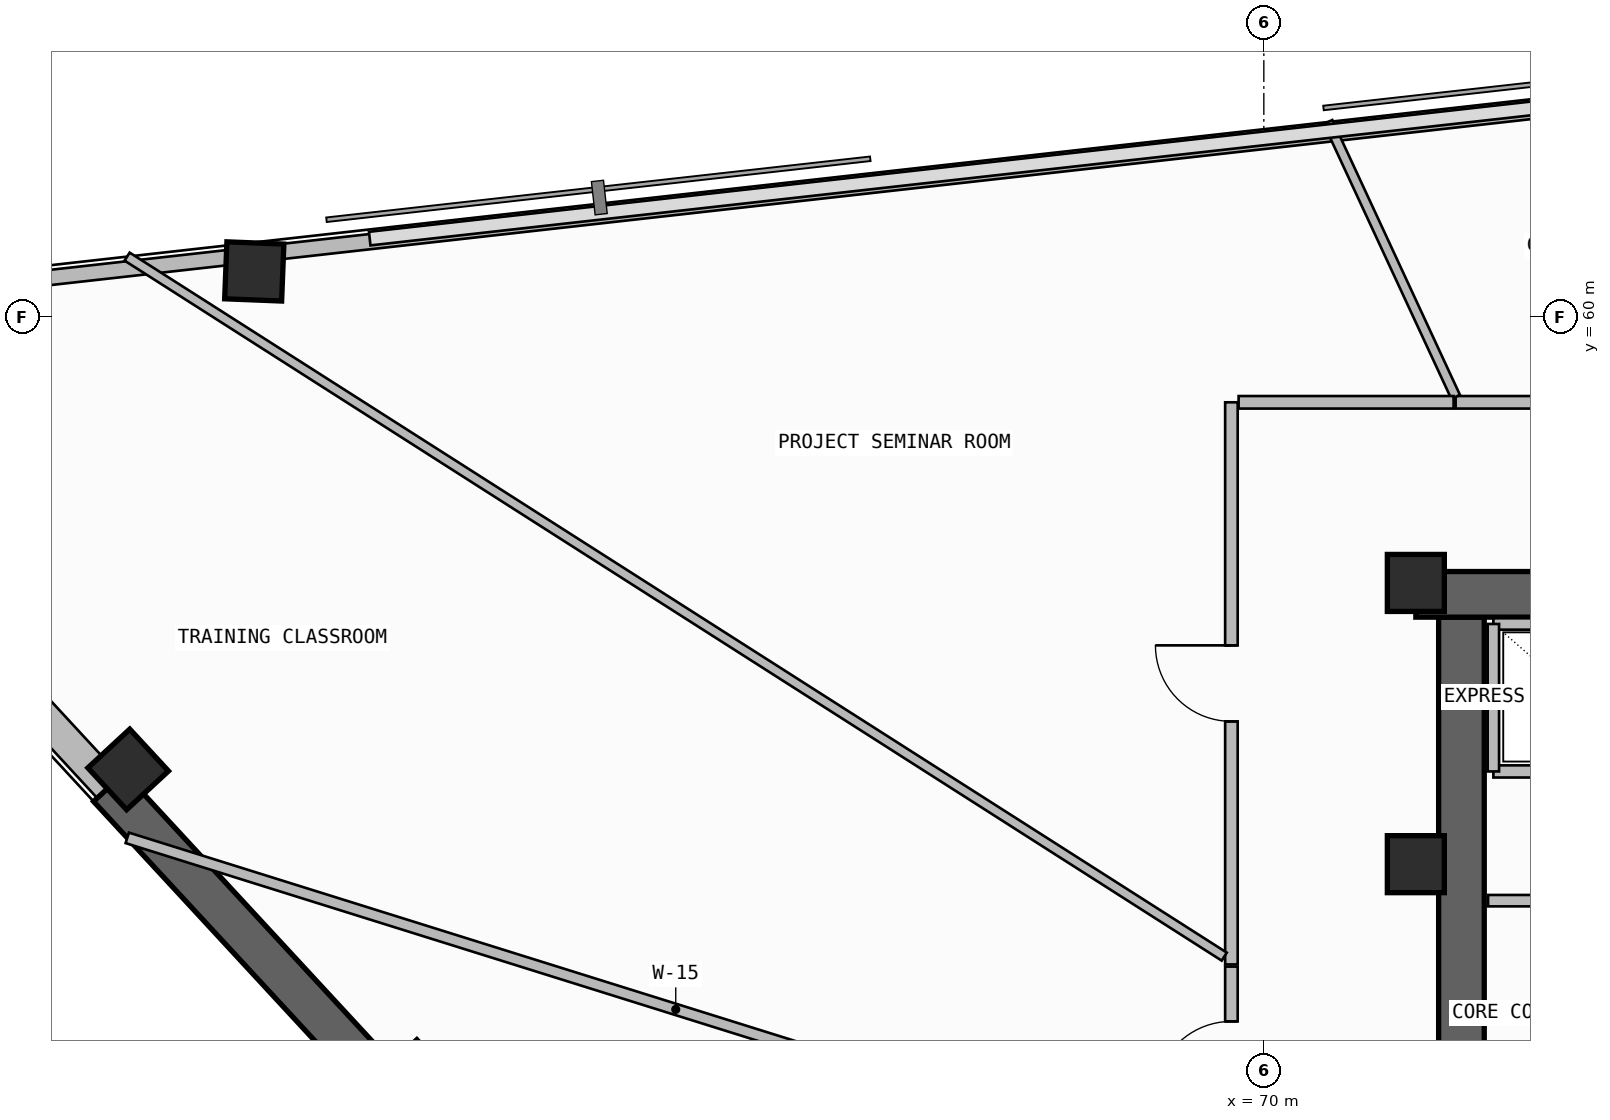
"""IFC4 building model, lengths in metres.
Left out: names, types, materials, properties, quantities, classifications, styles, units other than length and angle.
Written with IfcOpenShell. Run it as: python <this file> out.ifc"""

import sys

from ifc_helpers import new_model, si_unit, direction, frame, frame_2d, origin, origin_2d, place, context, subcontext, project, spatial, rectangle, extrude, element, fill, save


model = new_model("IFC4")
c1 = context("Model", 3, precision=1e-05, world=origin(), true_north=direction((0.0, 1.0)))
c2 = subcontext(c1, "Body", "Model", "MODEL_VIEW")
j1 = project(units=[si_unit("LENGTHUNIT", "METRE"), si_unit("PLANEANGLEUNIT", "RADIAN")], contexts=[c1])
p1 = place(None, origin())
s1 = spatial("IfcSite", under=j1, at=p1, CompositionType="ELEMENT")
p2 = place(p1, origin())
s2 = spatial("IfcBuilding", under=s1, at=p2, CompositionType="ELEMENT")
p3 = place(p2, frame((0.0, 0.0, 271.3)))
s3 = spatial("IfcBuildingStorey", under=s2, at=p3, CompositionType="ELEMENT", Elevation=271.3)
p4 = place(p3, frame((72.6, 43.35, -0.26), z_axis=(0.0, 0.0, 1.0), x_axis=(0.0, 1.0, 0.0)))
e1 = element("IfcWall", 1, at=p4, inside=s3, PredefinedType="SHEAR", context=c2, shape_type="SweptSolid", body=[
    extrude(rectangle(XDim=12.7, YDim=0.6, at=frame_2d((6.35, 0.0))), origin(), (0.0, 0.0, 1.0), 3.52),
])
p5 = place(p4, frame((1.35, 0.0, 0.26)))
e2 = element("IfcOpeningElement", 2, at=p5, cuts=e1, PredefinedType="OPENING", context=c2, shape_type="SweptSolid", body=[
    extrude(rectangle(XDim=1.2, YDim=2.2, at=frame_2d((0.6, 1.1))), frame((0.0, 0.31, 0.0), z_axis=(0.0, -1.0, 0.0), x_axis=(1.0, 0.0, 0.0)), (0.0, 0.0, 1.0), 0.62),
])
p6 = place(p3, frame((72.0, 56.35, -0.26), z_axis=(0.0, 0.0, 1.0), x_axis=(1.0, 0.0, 0.0)))
e3 = element("IfcWall", 3, at=p6, inside=s3, PredefinedType="SHEAR", context=c2, shape_type="SweptSolid", body=[
    extrude(rectangle(XDim=13.6, YDim=0.6, at=frame_2d((6.8, 0.0))), origin(), (0.0, 0.0, 1.0), 3.52),
])
for number, where, z_axis, x_axis in (
    (4, (72.0, 52.8, 0.0), (0.0, 0.0, 1.0), (1.0, 0.0, 0.0)),
    (5, (72.0, 56.5, 0.0), (0.0, 0.0, 1.0), (1.0, 0.0, 0.0)),
    (6, (56.717, 60.598, 0.0), (0.0, 0.0, 1.0), (0.039, 0.999, 0.0)),
    (7, (55.058, 54.046, 0.0), (0.0, 0.0, 1.0), (-0.679, 0.734, 0.0)),
    (8, (58.835, 49.961, 0.0), (0.0, 0.0, 1.0), (-0.679, 0.734, 0.0)),
):
    element("IfcColumn", number, at=place(p3, frame(where, z_axis=z_axis, x_axis=x_axis)), inside=s3, PredefinedType="COLUMN", context=c2, shape_type="SweptSolid", body=[
        extrude(rectangle(XDim=0.75, YDim=0.75, at=origin_2d()), origin(), (0.0, 0.0, 1.0), 3.52),
    ])
p7 = place(p3, frame((51.5, 57.387, 0.0), z_axis=(0.0, 0.0, 1.0), x_axis=(0.67880684669, -0.734316869537, 0.0)))
e9 = element("IfcWall", 9, at=p7, inside=s3, PredefinedType="SOLIDWALL", context=c2, shape_type="SweptSolid", body=[
    extrude(rectangle(XDim=4.869, YDim=0.42, at=frame_2d((2.434, 0.0))), origin(), (0.0, 0.0, 1.0), 2.645),
])
p8 = place(p7, frame((0.9, 0.0, 1.1)))
e10 = element("IfcOpeningElement", 10, at=p8, cuts=e9, PredefinedType="OPENING", context=c2, shape_type="SweptSolid", body=[
    extrude(rectangle(XDim=2.4, YDim=1.2, at=frame_2d((1.2, 0.6))), frame((0.0, 0.22, 0.0), z_axis=(0.0, -1.0, 0.0), x_axis=(1.0, 0.0, 0.0)), (0.0, 0.0, 1.0), 0.44),
])
p9 = place(p3, frame((54.805, 53.812, -0.26), z_axis=(0.0, 0.0, 1.0), x_axis=(0.678803115619, -0.734320318543, 0.0)))
e11 = element("IfcWall", 11, at=p9, inside=s3, PredefinedType="SHEAR", context=c2, shape_type="SweptSolid", body=[
    extrude(rectangle(XDim=18.083, YDim=0.55, at=frame_2d((9.042, 0.0))), origin(), (0.0, 0.0, 1.0), 3.52),
])
p10 = place(p9, frame((7.434, 0.0, 1.1)))
e12 = element("IfcOpeningElement", 12, at=p10, cuts=e11, PredefinedType="OPENING", context=c2, shape_type="SweptSolid", body=[
    extrude(rectangle(XDim=2.4, YDim=1.2, at=frame_2d((1.2, 0.6))), frame((0.0, 0.285, 0.0), z_axis=(0.0, -1.0, 0.0), x_axis=(1.0, 0.0, 0.0)), (0.0, 0.0, 1.0), 0.57),
])
p11 = place(p3, frame((81.557, 63.604, 0.0), z_axis=(0.0, 0.0, 1.0), x_axis=(-0.993776455024, -0.111392806945, 0.0)))
e13 = element("IfcWall", 13, at=p11, inside=s3, PredefinedType="PARAPET", context=c2, shape_type="SweptSolid", body=[
    extrude(rectangle(XDim=24.891, YDim=0.2, at=frame_2d((12.446, 0.0))), origin(), (0.0, 0.0, 1.0), 1.15),
])
p12 = place(p3, frame((56.565, 60.802, 0.0), z_axis=(0.0, 0.0, 1.0), x_axis=(-0.99377164586, -0.111435702918, 0.0)))
e14 = element("IfcWall", 14, at=p12, inside=s3, PredefinedType="PARAPET", context=c2, shape_type="SweptSolid", body=[
    extrude(rectangle(XDim=4.616, YDim=0.2, at=frame_2d((2.308, 0.0))), origin(), (0.0, 0.0, 1.0), 1.15),
])
p13 = place(p3, frame((72.95, 52.32, 0.0), z_axis=(0.0, 0.0, 1.0), x_axis=(1.0, 0.0, 0.0)))
e15 = element("IfcWall", 15, at=p13, inside=s3, PredefinedType="SOLIDWALL", context=c2, shape_type="SweptSolid", body=[
    extrude(rectangle(XDim=3.33, YDim=0.15, at=frame_2d((1.665, 0.0))), origin(), (0.0, 0.0, 1.0), 3.26),
])
p14 = place(p3, frame((73.02, 54.02, 0.0), z_axis=(0.0, 0.0, 1.0), x_axis=(1.0, 0.0, 0.0)))
e16 = element("IfcWall", 16, at=p14, inside=s3, PredefinedType="SOLIDWALL", context=c2, shape_type="SweptSolid", body=[
    extrude(rectangle(XDim=12.08, YDim=0.16, at=frame_2d((6.04, 0.0))), origin(), (0.0, 0.0, 1.0), 3.26),
])
p15 = place(p14, frame((4.03, 0.0, 0.0)))
e17 = element("IfcOpeningElement", 17, at=p15, cuts=e16, PredefinedType="OPENING", context=c2, shape_type="SweptSolid", body=[
    extrude(rectangle(XDim=1.1, YDim=2.25, at=frame_2d((0.55, 1.125))), frame((0.0, 0.09, 0.0), z_axis=(0.0, -1.0, 0.0), x_axis=(1.0, 0.0, 0.0)), (0.0, 0.0, 1.0), 0.18),
])
p16 = place(p14, frame((6.28, 0.0, 0.0)))
e18 = element("IfcOpeningElement", 18, at=p16, cuts=e16, PredefinedType="OPENING", context=c2, shape_type="SweptSolid", body=[
    extrude(rectangle(XDim=1.1, YDim=2.25, at=frame_2d((0.55, 1.125))), frame((0.0, 0.09, 0.0), z_axis=(0.0, -1.0, 0.0), x_axis=(1.0, 0.0, 0.0)), (0.0, 0.0, 1.0), 0.18),
])
p17 = place(p14, frame((8.53, 0.0, 0.0)))
e19 = element("IfcOpeningElement", 19, at=p17, cuts=e16, PredefinedType="OPENING", context=c2, shape_type="SweptSolid", body=[
    extrude(rectangle(XDim=1.1, YDim=2.25, at=frame_2d((0.55, 1.125))), frame((0.0, 0.09, 0.0), z_axis=(0.0, -1.0, 0.0), x_axis=(1.0, 0.0, 0.0)), (0.0, 0.0, 1.0), 0.18),
])
p18 = place(p3, frame((73.02, 55.96, 0.0), z_axis=(0.0, 0.0, 1.0), x_axis=(1.0, 0.0, 0.0)))
e20 = element("IfcWall", 20, at=p18, inside=s3, PredefinedType="SOLIDWALL", context=c2, shape_type="SweptSolid", body=[
    extrude(rectangle(XDim=3.5, YDim=0.15, at=frame_2d((1.75, 0.0))), origin(), (0.0, 0.0, 1.0), 3.26),
])
p19 = place(p3, frame((73.02, 54.02, 0.0), z_axis=(0.0, 0.0, 1.0), x_axis=(0.0, 1.0, 0.0)))
e21 = element("IfcWall", 21, at=p19, inside=s3, PredefinedType="PLUMBINGWALL", context=c2, shape_type="SweptSolid", body=[
    extrude(rectangle(XDim=1.94, YDim=0.15, at=frame_2d((0.97, 0.0))), origin(), (0.0, 0.0, 1.0), 3.26),
])
p20 = place(p3, frame((77.35, 58.876, 0.0), z_axis=(0.0, 0.0, 1.0), x_axis=(-1.0, 0.0, 0.0)))
e22 = element("IfcWall", 22, at=p20, inside=s3, PredefinedType="PARTITIONING", context=c2, shape_type="SweptSolid", body=[
    extrude(rectangle(XDim=4.827, YDim=0.165, at=frame_2d((2.413, 0.0))), origin(), (0.0, 0.0, 1.0), 3.26),
])
p21 = place(p3, frame((72.523, 58.948, 0.0), z_axis=(0.0, 0.0, 1.0), x_axis=(-0.421033933963, 0.90704488668, 0.0)))
e23 = element("IfcWall", 23, at=p21, inside=s3, PredefinedType="PARTITIONING", context=c2, shape_type="SweptSolid", body=[
    extrude(rectangle(XDim=3.987, YDim=0.125, at=frame_2d((1.993, 0.0))), origin(), (0.0, 0.0, 1.0), 3.26),
])
p22 = place(p3, frame((69.573, 58.876, 0.0), z_axis=(0.0, 0.0, 1.0), x_axis=(0.0, -1.0, 0.0)))
e24 = element("IfcWall", 24, at=p22, inside=s3, PredefinedType="PARTITIONING", context=c2, shape_type="SweptSolid", body=[
    extrude(rectangle(XDim=7.396, YDim=0.165, at=frame_2d((3.698, 0.0))), origin(), (0.0, 0.0, 1.0), 2.745),
])
p23 = place(p22, frame((3.198, 0.0, 0.0)))
e25 = element("IfcOpeningElement", 25, at=p23, cuts=e24, PredefinedType="OPENING", context=c2, shape_type="SweptSolid", body=[
    extrude(rectangle(XDim=1.0, YDim=2.2, at=frame_2d((0.5, 1.1))), frame((0.0, 0.093, 0.0), z_axis=(0.0, -1.0, 0.0), x_axis=(1.0, 0.0, 0.0)), (0.0, 0.0, 1.0), 0.185),
])
p24 = place(p3, frame((72.497, 58.876, 0.0), z_axis=(0.0, 0.0, 1.0), x_axis=(-1.0, 0.0, 0.0)))
e26 = element("IfcWall", 26, at=p24, inside=s3, PredefinedType="PARTITIONING", context=c2, shape_type="SweptSolid", body=[
    extrude(rectangle(XDim=2.829, YDim=0.165, at=frame_2d((1.414, 0.0))), origin(), (0.0, 0.0, 1.0), 3.26),
])
p25 = place(p3, frame((69.479, 51.584, 0.0), z_axis=(0.0, 0.0, 1.0), x_axis=(-0.843040926806, 0.537849417337, 0.0)))
e27 = element("IfcWall", 27, at=p25, inside=s3, PredefinedType="PARTITIONING", context=c2, shape_type="SweptSolid", body=[
    extrude(rectangle(XDim=17.122, YDim=0.125, at=frame_2d((8.561, 0.0))), origin(), (0.0, 0.0, 1.0), 2.645),
])
p26 = place(p3, frame((69.573, 51.452, 0.0), z_axis=(0.0, 0.0, 1.0), x_axis=(0.0, -1.0, 0.0)))
e28 = element("IfcWall", 28, at=p26, inside=s3, PredefinedType="PARTITIONING", context=c2, shape_type="SweptSolid", body=[
    extrude(rectangle(XDim=2.887, YDim=0.165, at=frame_2d((1.444, 0.0))), origin(), (0.0, 0.0, 1.0), 2.745),
])
p27 = place(p26, frame((0.721, 0.0, 0.0)))
e29 = element("IfcOpeningElement", 29, at=p27, cuts=e28, PredefinedType="OPENING", context=c2, shape_type="SweptSolid", body=[
    extrude(rectangle(XDim=1.0, YDim=2.2, at=frame_2d((0.5, 1.1))), frame((0.0, 0.093, 0.0), z_axis=(0.0, -1.0, 0.0), x_axis=(1.0, 0.0, 0.0)), (0.0, 0.0, 1.0), 0.185),
])
p28 = place(p3, frame((69.479, 48.632, 0.0), z_axis=(0.0, 0.0, 1.0), x_axis=(-0.95441273418, 0.298490088336, 0.0)))
e30 = element("IfcWall", 30, at=p28, inside=s3, PredefinedType="PARTITIONING", context=c2, shape_type="SweptSolid", body=[
    extrude(rectangle(XDim=15.123, YDim=0.145, at=frame_2d((7.561, 0.0))), origin(), (0.0, 0.0, 1.0), 2.645),
])
p29 = place(p23, frame((1.0, 0.0, 0.0), z_axis=(0.0, 0.0, 1.0), x_axis=(-1.0, 0.0, 0.0)))
e31 = element("IfcDoor", 31, at=p29, inside=s3, OperationType="SINGLE_SWING_RIGHT", PredefinedType="DOOR", context=c2, shape_type="SweptSolid", body=[
    extrude(rectangle(XDim=1.0, YDim=2.2, at=frame_2d((0.5, 1.1))), frame((0.0, 0.025, 0.0), z_axis=(0.0, -1.0, 0.0), x_axis=(1.0, 0.0, 0.0)), (0.0, 0.0, 1.0), 0.05),
])
fill(e25, e31)
p30 = place(p27, frame((1.0, 0.0, 0.0), z_axis=(0.0, 0.0, 1.0), x_axis=(-1.0, 0.0, 0.0)))
e32 = element("IfcDoor", 32, at=p30, inside=s3, OperationType="SINGLE_SWING_LEFT", PredefinedType="DOOR", context=c2, shape_type="SweptSolid", body=[
    extrude(rectangle(XDim=1.0, YDim=2.2, at=frame_2d((0.5, 1.1))), frame((0.0, 0.025, 0.0), z_axis=(0.0, -1.0, 0.0), x_axis=(1.0, 0.0, 0.0)), (0.0, 0.0, 1.0), 0.05),
])
fill(e29, e32)
save(model, sys.argv[1])
